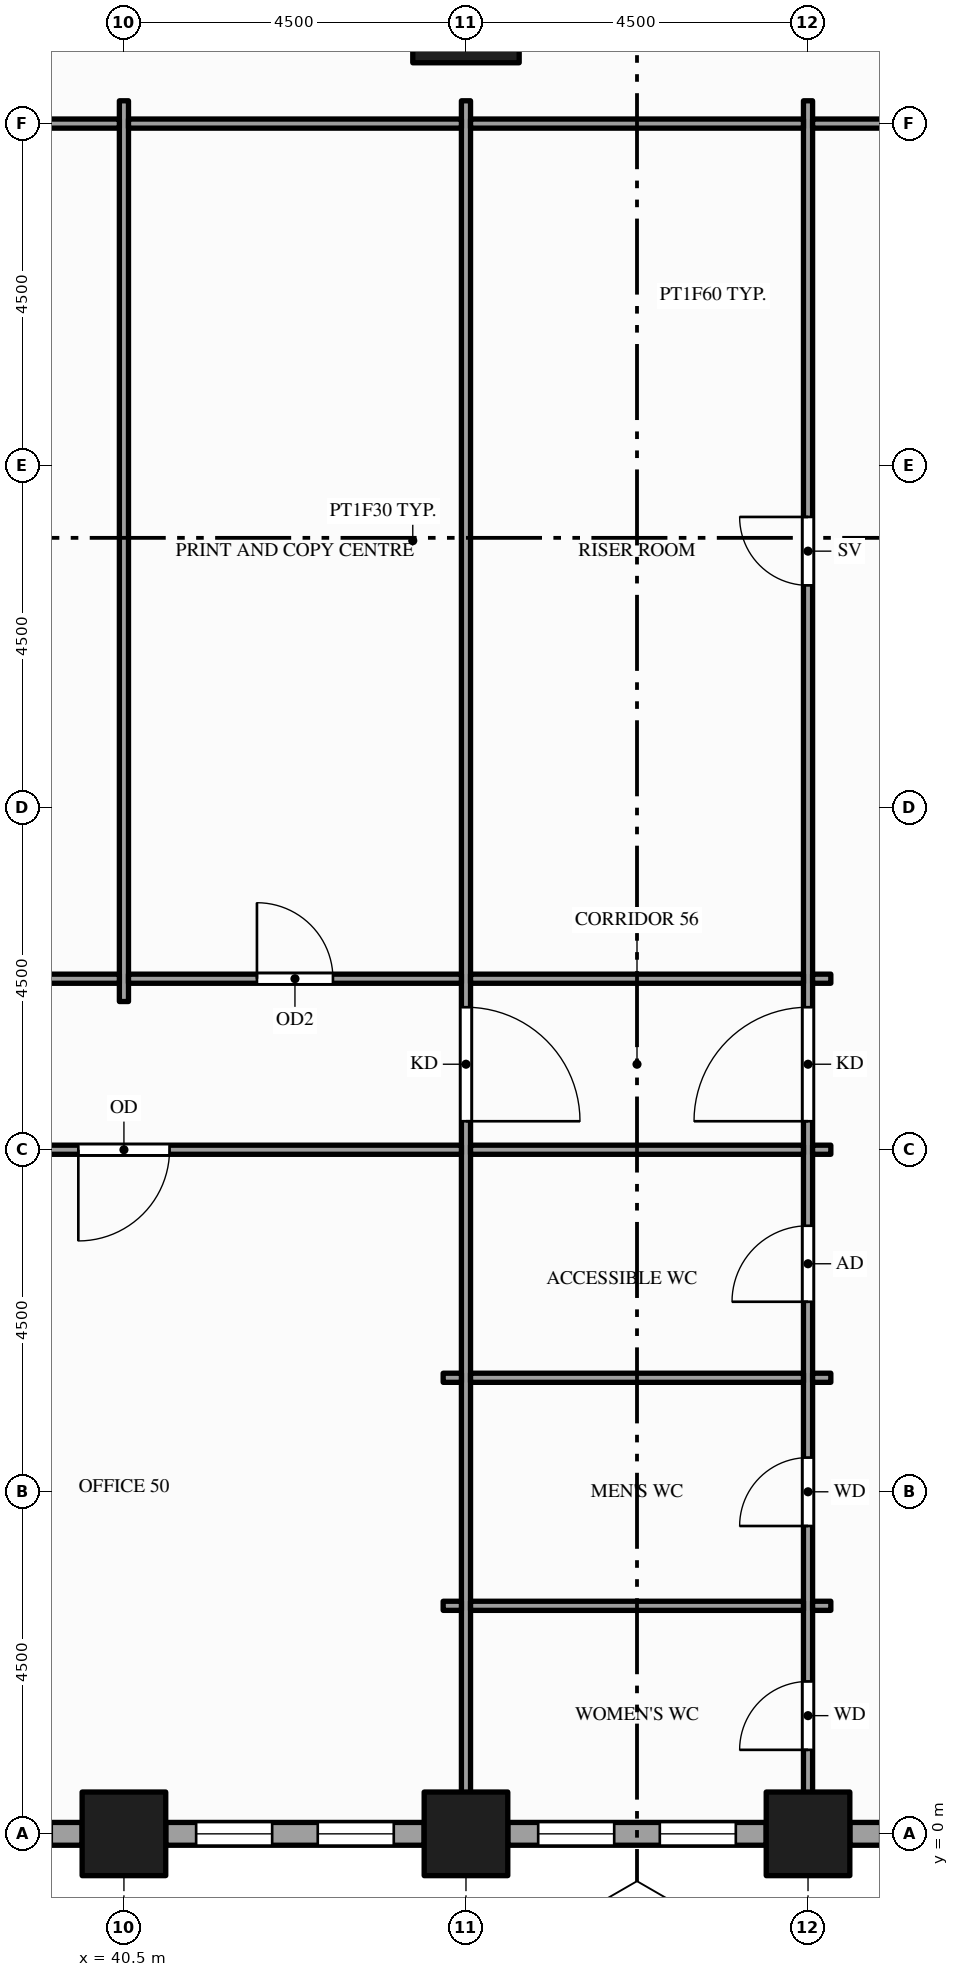
"""IFC4 building model, lengths in metres.
Left out: names, types, materials, properties, quantities, classifications, styles, units other than length and angle.
Written with IfcOpenShell. Run it as: python <this file> out.ifc"""

import sys

from ifc_helpers import new_model, si_unit, direction, frame, frame_2d, origin, origin_2d, place, context, subcontext, project, spatial, rectangle, hollow_rectangle, extrude, element, fill, save


model = new_model("IFC4")
c1 = context("Model", 3, precision=1e-05, world=origin(), true_north=direction((0.0, 1.0)))
c2 = subcontext(c1, "Body", "Model", "MODEL_VIEW")
j1 = project(units=[si_unit("LENGTHUNIT", "METRE"), si_unit("PLANEANGLEUNIT", "RADIAN")], contexts=[c1])
p1 = place(None, origin())
s1 = spatial("IfcSite", under=j1, at=p1, CompositionType="ELEMENT")
p2 = place(p1, origin())
s2 = spatial("IfcBuilding", under=s1, at=p2, CompositionType="ELEMENT")
p3 = place(p2, frame((0.0, 0.0, 19.0)))
s3 = spatial("IfcBuildingStorey", under=s2, at=p3, CompositionType="ELEMENT", Elevation=19.0)
for number, where, z_axis, x_axis in (
    (1, (40.5, 0.0, -0.25), (0.0, 0.0, 1.0), (1.0, 0.0, 0.0)),
    (2, (45.0, 0.0, -0.25), (0.0, 0.0, 1.0), (1.0, 0.0, 0.0)),
):
    element("IfcColumn", number, at=place(p3, frame(where, z_axis=z_axis, x_axis=x_axis)), inside=s3, PredefinedType="COLUMN", context=c2, shape_type="SweptSolid", body=[
        extrude(hollow_rectangle(XDim=1.1, YDim=1.1, WallThickness=0.06, at=origin_2d()), origin(), (0.0, 0.0, 1.0), 5.0),
    ])
p4 = place(p3, frame((45.0, 24.0, -0.25), z_axis=(0.0, 0.0, 1.0), x_axis=(1.0, 0.0, 0.0)))
e3 = element("IfcColumn", 3, at=p4, inside=s3, PredefinedType="COLUMN", context=c2, shape_type="SweptSolid", body=[
    extrude(hollow_rectangle(XDim=1.4, YDim=1.4, WallThickness=0.08, at=origin_2d()), origin(), (0.0, 0.0, 1.0), 5.0),
])
p5 = place(p3, frame((49.5, 0.0, -0.25), z_axis=(0.0, 0.0, 1.0), x_axis=(1.0, 0.0, 0.0)))
e4 = element("IfcColumn", 4, at=p5, inside=s3, PredefinedType="COLUMN", context=c2, shape_type="SweptSolid", body=[
    extrude(hollow_rectangle(XDim=1.1, YDim=1.1, WallThickness=0.06, at=origin_2d()), origin(), (0.0, 0.0, 1.0), 5.0),
])
p6 = place(p3, frame((36.55, 0.0, 0.0), z_axis=(0.0, 0.0, 1.0), x_axis=(1.0, 0.0, 0.0)))
e5 = element("IfcWall", 5, at=p6, inside=s3, PredefinedType="STANDARD", context=c2, shape_type="SweptSolid", body=[
    extrude(rectangle(XDim=3.4, YDim=0.3, at=frame_2d((1.7, 0.0))), origin(), (0.0, 0.0, 1.0), 4.036),
])
p7 = place(p6, frame((0.4, 0.0, 0.9)))
e6 = element("IfcOpeningElement", 6, at=p7, cuts=e5, PredefinedType="OPENING", context=c2, shape_type="SweptSolid", body=[
    extrude(rectangle(XDim=1.0, YDim=2.75, at=frame_2d((0.5, 1.375))), frame((0.0, 0.16, 0.0), z_axis=(0.0, -1.0, 0.0), x_axis=(1.0, 0.0, 0.0)), (0.0, 0.0, 1.0), 0.32),
])
p8 = place(p6, frame((2.0, 0.0, 0.9)))
e7 = element("IfcOpeningElement", 7, at=p8, cuts=e5, PredefinedType="OPENING", context=c2, shape_type="SweptSolid", body=[
    extrude(rectangle(XDim=1.0, YDim=2.75, at=frame_2d((0.5, 1.375))), frame((0.0, 0.16, 0.0), z_axis=(0.0, -1.0, 0.0), x_axis=(1.0, 0.0, 0.0)), (0.0, 0.0, 1.0), 0.32),
])
p9 = place(p3, frame((41.05, 0.0, 0.0), z_axis=(0.0, 0.0, 1.0), x_axis=(1.0, 0.0, 0.0)))
e8 = element("IfcWall", 8, at=p9, inside=s3, PredefinedType="STANDARD", context=c2, shape_type="SweptSolid", body=[
    extrude(rectangle(XDim=3.4, YDim=0.3, at=frame_2d((1.7, 0.0))), origin(), (0.0, 0.0, 1.0), 4.036),
])
p10 = place(p9, frame((0.4, 0.0, 0.9)))
e9 = element("IfcOpeningElement", 9, at=p10, cuts=e8, PredefinedType="OPENING", context=c2, shape_type="SweptSolid", body=[
    extrude(rectangle(XDim=1.0, YDim=2.75, at=frame_2d((0.5, 1.375))), frame((0.0, 0.16, 0.0), z_axis=(0.0, -1.0, 0.0), x_axis=(1.0, 0.0, 0.0)), (0.0, 0.0, 1.0), 0.32),
])
p11 = place(p9, frame((2.0, 0.0, 0.9)))
e10 = element("IfcOpeningElement", 10, at=p11, cuts=e8, PredefinedType="OPENING", context=c2, shape_type="SweptSolid", body=[
    extrude(rectangle(XDim=1.0, YDim=2.75, at=frame_2d((0.5, 1.375))), frame((0.0, 0.16, 0.0), z_axis=(0.0, -1.0, 0.0), x_axis=(1.0, 0.0, 0.0)), (0.0, 0.0, 1.0), 0.32),
])
p12 = place(p3, frame((45.55, 0.0, 0.0), z_axis=(0.0, 0.0, 1.0), x_axis=(1.0, 0.0, 0.0)))
e11 = element("IfcWall", 11, at=p12, inside=s3, PredefinedType="STANDARD", context=c2, shape_type="SweptSolid", body=[
    extrude(rectangle(XDim=3.4, YDim=0.3, at=frame_2d((1.7, 0.0))), origin(), (0.0, 0.0, 1.0), 4.036),
])
p13 = place(p12, frame((0.4, 0.0, 0.9)))
e12 = element("IfcOpeningElement", 12, at=p13, cuts=e11, PredefinedType="OPENING", context=c2, shape_type="SweptSolid", body=[
    extrude(rectangle(XDim=1.0, YDim=2.75, at=frame_2d((0.5, 1.375))), frame((0.0, 0.16, 0.0), z_axis=(0.0, -1.0, 0.0), x_axis=(1.0, 0.0, 0.0)), (0.0, 0.0, 1.0), 0.32),
])
p14 = place(p12, frame((2.0, 0.0, 0.9)))
e13 = element("IfcOpeningElement", 13, at=p14, cuts=e11, PredefinedType="OPENING", context=c2, shape_type="SweptSolid", body=[
    extrude(rectangle(XDim=1.0, YDim=2.75, at=frame_2d((0.5, 1.375))), frame((0.0, 0.16, 0.0), z_axis=(0.0, -1.0, 0.0), x_axis=(1.0, 0.0, 0.0)), (0.0, 0.0, 1.0), 0.32),
])
p15 = place(p3, frame((50.05, 0.0, 0.0), z_axis=(0.0, 0.0, 1.0), x_axis=(1.0, 0.0, 0.0)))
e14 = element("IfcWall", 14, at=p15, inside=s3, PredefinedType="STANDARD", context=c2, shape_type="SweptSolid", body=[
    extrude(rectangle(XDim=3.949, YDim=0.3, at=frame_2d((1.975, 0.0))), origin(), (0.0, 0.0, 1.0), 4.036),
])
p16 = place(p15, frame((0.4, 0.0, 0.9)))
e15 = element("IfcOpeningElement", 15, at=p16, cuts=e14, PredefinedType="OPENING", context=c2, shape_type="SweptSolid", body=[
    extrude(rectangle(XDim=1.0, YDim=2.75, at=frame_2d((0.5, 1.375))), frame((0.0, 0.16, 0.0), z_axis=(0.0, -1.0, 0.0), x_axis=(1.0, 0.0, 0.0)), (0.0, 0.0, 1.0), 0.32),
])
p17 = place(p15, frame((2.024, 0.0, 0.9)))
e16 = element("IfcOpeningElement", 16, at=p17, cuts=e14, PredefinedType="OPENING", context=c2, shape_type="SweptSolid", body=[
    extrude(rectangle(XDim=1.5, YDim=2.75, at=frame_2d((0.75, 1.375))), frame((0.0, 0.16, 0.0), z_axis=(0.0, -1.0, 0.0), x_axis=(1.0, 0.0, 0.0)), (0.0, 0.0, 1.0), 0.32),
])
p18 = place(p3, frame((40.5, 10.95, 0.0), z_axis=(0.0, 0.0, 1.0), x_axis=(0.0, 1.0, 0.0)))
e17 = element("IfcWall", 17, at=p18, inside=s3, PredefinedType="PARTITIONING", context=c2, shape_type="SweptSolid", body=[
    extrude(rectangle(XDim=11.85, YDim=0.12, at=frame_2d((5.925, 0.0))), origin(), (0.0, 0.0, 1.0), 3.759),
])
p19 = place(p3, frame((45.0, 0.15, 0.0), z_axis=(0.0, 0.0, 1.0), x_axis=(0.0, 1.0, 0.0)))
e18 = element("IfcWall", 18, at=p19, inside=s3, PredefinedType="PARTITIONING", context=c2, shape_type="SweptSolid", body=[
    extrude(rectangle(XDim=22.65, YDim=0.12, at=frame_2d((11.325, 0.0))), origin(), (0.0, 0.0, 1.0), 3.759),
])
p20 = place(p19, frame((9.225, 0.0, 0.0)))
e19 = element("IfcOpeningElement", 19, at=p20, cuts=e18, PredefinedType="OPENING", context=c2, shape_type="SweptSolid", body=[
    extrude(rectangle(XDim=1.5, YDim=2.1, at=frame_2d((0.75, 1.05))), frame((0.0, 0.07, 0.0), z_axis=(0.0, -1.0, 0.0), x_axis=(1.0, 0.0, 0.0)), (0.0, 0.0, 1.0), 0.14),
])
p21 = place(p3, frame((49.5, 0.15, 0.0), z_axis=(0.0, 0.0, 1.0), x_axis=(0.0, 1.0, 0.0)))
e20 = element("IfcWall", 20, at=p21, inside=s3, PredefinedType="PARTITIONING", context=c2, shape_type="SweptSolid", body=[
    extrude(rectangle(XDim=22.65, YDim=0.12, at=frame_2d((11.325, 0.0))), origin(), (0.0, 0.0, 1.0), 3.759),
])
p22 = place(p21, frame((0.955, 0.0, 0.0)))
e21 = element("IfcOpeningElement", 21, at=p22, cuts=e20, PredefinedType="OPENING", context=c2, shape_type="SweptSolid", body=[
    extrude(rectangle(XDim=0.9, YDim=2.1, at=frame_2d((0.45, 1.05))), frame((0.0, 0.07, 0.0), z_axis=(0.0, -1.0, 0.0), x_axis=(1.0, 0.0, 0.0)), (0.0, 0.0, 1.0), 0.14),
])
p23 = place(p21, frame((3.9, 0.0, 0.0)))
e22 = element("IfcOpeningElement", 22, at=p23, cuts=e20, PredefinedType="OPENING", context=c2, shape_type="SweptSolid", body=[
    extrude(rectangle(XDim=0.9, YDim=2.1, at=frame_2d((0.45, 1.05))), frame((0.0, 0.07, 0.0), z_axis=(0.0, -1.0, 0.0), x_axis=(1.0, 0.0, 0.0)), (0.0, 0.0, 1.0), 0.14),
])
p24 = place(p21, frame((6.85, 0.0, 0.0)))
e23 = element("IfcOpeningElement", 23, at=p24, cuts=e20, PredefinedType="OPENING", context=c2, shape_type="SweptSolid", body=[
    extrude(rectangle(XDim=1.0, YDim=2.1, at=frame_2d((0.5, 1.05))), frame((0.0, 0.07, 0.0), z_axis=(0.0, -1.0, 0.0), x_axis=(1.0, 0.0, 0.0)), (0.0, 0.0, 1.0), 0.14),
])
p25 = place(p21, frame((16.275, 0.0, 0.0)))
e24 = element("IfcOpeningElement", 24, at=p25, cuts=e20, PredefinedType="OPENING", context=c2, shape_type="SweptSolid", body=[
    extrude(rectangle(XDim=0.9, YDim=2.1, at=frame_2d((0.45, 1.05))), frame((0.0, 0.07, 0.0), z_axis=(0.0, -1.0, 0.0), x_axis=(1.0, 0.0, 0.0)), (0.0, 0.0, 1.0), 0.14),
])
p26 = place(p21, frame((9.225, 0.0, 0.0)))
e25 = element("IfcOpeningElement", 25, at=p26, cuts=e20, PredefinedType="OPENING", context=c2, shape_type="SweptSolid", body=[
    extrude(rectangle(XDim=1.5, YDim=2.1, at=frame_2d((0.75, 1.05))), frame((0.0, 0.07, 0.0), z_axis=(0.0, -1.0, 0.0), x_axis=(1.0, 0.0, 0.0)), (0.0, 0.0, 1.0), 0.14),
])
p27 = place(p3, frame((44.7, 3.0, 0.0), z_axis=(0.0, 0.0, 1.0), x_axis=(1.0, 0.0, 0.0)))
e26 = element("IfcWall", 26, at=p27, inside=s3, PredefinedType="PARTITIONING", context=c2, shape_type="SweptSolid", body=[
    extrude(rectangle(XDim=0.24, YDim=0.12, at=frame_2d((0.12, 0.0))), origin(), (0.0, 0.0, 1.0), 3.759),
])
p28 = place(p3, frame((45.06, 3.0, 0.0), z_axis=(0.0, 0.0, 1.0), x_axis=(1.0, 0.0, 0.0)))
e27 = element("IfcWall", 27, at=p28, inside=s3, PredefinedType="PARTITIONING", context=c2, shape_type="SweptSolid", body=[
    extrude(rectangle(XDim=4.38, YDim=0.12, at=frame_2d((2.19, 0.0))), origin(), (0.0, 0.0, 1.0), 3.66),
])
for number, where, z_axis, x_axis in (
    (28, (49.56, 3.0, 0.0), (0.0, 0.0, 1.0), (1.0, 0.0, 0.0)),
    (29, (44.7, 6.0, 0.0), (0.0, 0.0, 1.0), (1.0, 0.0, 0.0)),
):
    element("IfcWall", number, at=place(p3, frame(where, z_axis=z_axis, x_axis=x_axis)), inside=s3, PredefinedType="PARTITIONING", context=c2, shape_type="SweptSolid", body=[
        extrude(rectangle(XDim=0.24, YDim=0.12, at=frame_2d((0.12, 0.0))), origin(), (0.0, 0.0, 1.0), 3.759),
    ])
p29 = place(p3, frame((45.06, 6.0, 0.0), z_axis=(0.0, 0.0, 1.0), x_axis=(1.0, 0.0, 0.0)))
e30 = element("IfcWall", 30, at=p29, inside=s3, PredefinedType="PARTITIONING", context=c2, shape_type="SweptSolid", body=[
    extrude(rectangle(XDim=4.38, YDim=0.12, at=frame_2d((2.19, 0.0))), origin(), (0.0, 0.0, 1.0), 3.66),
])
p30 = place(p3, frame((49.56, 6.0, 0.0), z_axis=(0.0, 0.0, 1.0), x_axis=(1.0, 0.0, 0.0)))
e31 = element("IfcWall", 31, at=p30, inside=s3, PredefinedType="PARTITIONING", context=c2, shape_type="SweptSolid", body=[
    extrude(rectangle(XDim=0.24, YDim=0.12, at=frame_2d((0.12, 0.0))), origin(), (0.0, 0.0, 1.0), 3.759),
])
p31 = place(p3, frame((36.06, 9.0, 0.0), z_axis=(0.0, 0.0, 1.0), x_axis=(1.0, 0.0, 0.0)))
e32 = element("IfcWall", 32, at=p31, inside=s3, PredefinedType="PARTITIONING", context=c2, shape_type="SweptSolid", body=[
    extrude(rectangle(XDim=8.88, YDim=0.12, at=frame_2d((4.44, 0.0))), origin(), (0.0, 0.0, 1.0), 3.66),
])
p32 = place(p31, frame((3.84, 0.0, 0.0)))
e33 = element("IfcOpeningElement", 33, at=p32, cuts=e32, PredefinedType="OPENING", context=c2, shape_type="SweptSolid", body=[
    extrude(rectangle(XDim=1.2, YDim=2.1, at=frame_2d((0.6, 1.05))), frame((0.0, 0.07, 0.0), z_axis=(0.0, -1.0, 0.0), x_axis=(1.0, 0.0, 0.0)), (0.0, 0.0, 1.0), 0.14),
])
p33 = place(p3, frame((45.06, 9.0, 0.0), z_axis=(0.0, 0.0, 1.0), x_axis=(1.0, 0.0, 0.0)))
e34 = element("IfcWall", 34, at=p33, inside=s3, PredefinedType="PARTITIONING", context=c2, shape_type="SweptSolid", body=[
    extrude(rectangle(XDim=4.38, YDim=0.12, at=frame_2d((2.19, 0.0))), origin(), (0.0, 0.0, 1.0), 3.66),
])
p34 = place(p3, frame((49.56, 9.0, 0.0), z_axis=(0.0, 0.0, 1.0), x_axis=(1.0, 0.0, 0.0)))
e35 = element("IfcWall", 35, at=p34, inside=s3, PredefinedType="PARTITIONING", context=c2, shape_type="SweptSolid", body=[
    extrude(rectangle(XDim=0.24, YDim=0.12, at=frame_2d((0.12, 0.0))), origin(), (0.0, 0.0, 1.0), 3.759),
])
p35 = place(p3, frame((36.06, 11.25, 0.0), z_axis=(0.0, 0.0, 1.0), x_axis=(1.0, 0.0, 0.0)))
e36 = element("IfcWall", 36, at=p35, inside=s3, PredefinedType="PARTITIONING", context=c2, shape_type="SweptSolid", body=[
    extrude(rectangle(XDim=4.38, YDim=0.12, at=frame_2d((2.19, 0.0))), origin(), (0.0, 0.0, 1.0), 3.66),
])
p36 = place(p35, frame((1.69, 0.0, 0.0)))
e37 = element("IfcOpeningElement", 37, at=p36, cuts=e36, PredefinedType="OPENING", context=c2, shape_type="SweptSolid", body=[
    extrude(rectangle(XDim=1.0, YDim=2.1, at=frame_2d((0.5, 1.05))), frame((0.0, 0.07, 0.0), z_axis=(0.0, -1.0, 0.0), x_axis=(1.0, 0.0, 0.0)), (0.0, 0.0, 1.0), 0.14),
])
p37 = place(p3, frame((40.56, 11.25, 0.0), z_axis=(0.0, 0.0, 1.0), x_axis=(1.0, 0.0, 0.0)))
e38 = element("IfcWall", 38, at=p37, inside=s3, PredefinedType="PARTITIONING", context=c2, shape_type="SweptSolid", body=[
    extrude(rectangle(XDim=4.38, YDim=0.12, at=frame_2d((2.19, 0.0))), origin(), (0.0, 0.0, 1.0), 3.66),
])
p38 = place(p37, frame((1.69, 0.0, 0.0)))
e39 = element("IfcOpeningElement", 39, at=p38, cuts=e38, PredefinedType="OPENING", context=c2, shape_type="SweptSolid", body=[
    extrude(rectangle(XDim=1.0, YDim=2.1, at=frame_2d((0.5, 1.05))), frame((0.0, 0.07, 0.0), z_axis=(0.0, -1.0, 0.0), x_axis=(1.0, 0.0, 0.0)), (0.0, 0.0, 1.0), 0.14),
])
p39 = place(p3, frame((45.06, 11.25, 0.0), z_axis=(0.0, 0.0, 1.0), x_axis=(1.0, 0.0, 0.0)))
e40 = element("IfcWall", 40, at=p39, inside=s3, PredefinedType="PARTITIONING", context=c2, shape_type="SweptSolid", body=[
    extrude(rectangle(XDim=4.38, YDim=0.12, at=frame_2d((2.19, 0.0))), origin(), (0.0, 0.0, 1.0), 3.66),
])
p40 = place(p3, frame((49.56, 11.25, 0.0), z_axis=(0.0, 0.0, 1.0), x_axis=(1.0, 0.0, 0.0)))
e41 = element("IfcWall", 41, at=p40, inside=s3, PredefinedType="PARTITIONING", context=c2, shape_type="SweptSolid", body=[
    extrude(rectangle(XDim=0.24, YDim=0.12, at=frame_2d((0.12, 0.0))), origin(), (0.0, 0.0, 1.0), 3.759),
])
for number, where, z_axis, x_axis in (
    (42, (36.06, 22.5, 0.0), (0.0, 0.0, 1.0), (1.0, 0.0, 0.0)),
    (43, (40.56, 22.5, 0.0), (0.0, 0.0, 1.0), (1.0, 0.0, 0.0)),
    (44, (45.06, 22.5, 0.0), (0.0, 0.0, 1.0), (1.0, 0.0, 0.0)),
):
    element("IfcWall", number, at=place(p3, frame(where, z_axis=z_axis, x_axis=x_axis)), inside=s3, PredefinedType="PARTITIONING", context=c2, shape_type="SweptSolid", body=[
        extrude(rectangle(XDim=4.38, YDim=0.12, at=frame_2d((2.19, 0.0))), origin(), (0.0, 0.0, 1.0), 3.66),
    ])
p41 = place(p3, frame((49.56, 22.5, 0.0), z_axis=(0.0, 0.0, 1.0), x_axis=(1.0, 0.0, 0.0)))
e45 = element("IfcWall", 45, at=p41, inside=s3, PredefinedType="PARTITIONING", context=c2, shape_type="SweptSolid", body=[
    extrude(rectangle(XDim=4.54, YDim=0.12, at=frame_2d((2.27, 0.0))), origin(), (0.0, 0.0, 1.0), 3.66),
])
p42 = place(p41, frame((1.29, 0.0, 0.0)))
e46 = element("IfcOpeningElement", 46, at=p42, cuts=e45, PredefinedType="OPENING", context=c2, shape_type="SweptSolid", body=[
    extrude(rectangle(XDim=1.8, YDim=2.1, at=frame_2d((0.9, 1.05))), frame((0.0, 0.07, 0.0), z_axis=(0.0, -1.0, 0.0), x_axis=(1.0, 0.0, 0.0)), (0.0, 0.0, 1.0), 0.14),
])
p43 = place(p10, origin())
e47 = element("IfcWindow", 47, at=p43, inside=s3, PartitioningType="SINGLE_PANEL", PredefinedType="WINDOW", context=c2, shape_type="SweptSolid", body=[
    extrude(rectangle(XDim=1.0, YDim=2.75, at=frame_2d((0.5, 1.375))), frame((0.0, 0.03, 0.0), z_axis=(0.0, -1.0, 0.0), x_axis=(1.0, 0.0, 0.0)), (0.0, 0.0, 1.0), 0.06),
])
fill(e9, e47)
p44 = place(p11, origin())
e48 = element("IfcWindow", 48, at=p44, inside=s3, PartitioningType="SINGLE_PANEL", PredefinedType="WINDOW", context=c2, shape_type="SweptSolid", body=[
    extrude(rectangle(XDim=1.0, YDim=2.75, at=frame_2d((0.5, 1.375))), frame((0.0, 0.03, 0.0), z_axis=(0.0, -1.0, 0.0), x_axis=(1.0, 0.0, 0.0)), (0.0, 0.0, 1.0), 0.06),
])
fill(e10, e48)
p45 = place(p13, origin())
e49 = element("IfcWindow", 49, at=p45, inside=s3, PartitioningType="SINGLE_PANEL", PredefinedType="WINDOW", context=c2, shape_type="SweptSolid", body=[
    extrude(rectangle(XDim=1.0, YDim=2.75, at=frame_2d((0.5, 1.375))), frame((0.0, 0.03, 0.0), z_axis=(0.0, -1.0, 0.0), x_axis=(1.0, 0.0, 0.0)), (0.0, 0.0, 1.0), 0.06),
])
fill(e12, e49)
p46 = place(p14, origin())
e50 = element("IfcWindow", 50, at=p46, inside=s3, PartitioningType="SINGLE_PANEL", PredefinedType="WINDOW", context=c2, shape_type="SweptSolid", body=[
    extrude(rectangle(XDim=1.0, YDim=2.75, at=frame_2d((0.5, 1.375))), frame((0.0, 0.03, 0.0), z_axis=(0.0, -1.0, 0.0), x_axis=(1.0, 0.0, 0.0)), (0.0, 0.0, 1.0), 0.06),
])
fill(e13, e50)
p47 = place(p22, origin())
e51 = element("IfcDoor", 51, at=p47, inside=s3, OperationType="SINGLE_SWING_LEFT", PredefinedType="DOOR", context=c2, shape_type="SweptSolid", body=[
    extrude(rectangle(XDim=0.9, YDim=2.1, at=frame_2d((0.45, 1.05))), frame((0.0, 0.025, 0.0), z_axis=(0.0, -1.0, 0.0), x_axis=(1.0, 0.0, 0.0)), (0.0, 0.0, 1.0), 0.05),
])
fill(e21, e51)
p48 = place(p23, origin())
e52 = element("IfcDoor", 52, at=p48, inside=s3, OperationType="SINGLE_SWING_LEFT", PredefinedType="DOOR", context=c2, shape_type="SweptSolid", body=[
    extrude(rectangle(XDim=0.9, YDim=2.1, at=frame_2d((0.45, 1.05))), frame((0.0, 0.025, 0.0), z_axis=(0.0, -1.0, 0.0), x_axis=(1.0, 0.0, 0.0)), (0.0, 0.0, 1.0), 0.05),
])
fill(e22, e52)
p49 = place(p24, origin())
e53 = element("IfcDoor", 53, at=p49, inside=s3, OperationType="SINGLE_SWING_LEFT", PredefinedType="DOOR", context=c2, shape_type="SweptSolid", body=[
    extrude(rectangle(XDim=1.0, YDim=2.1, at=frame_2d((0.5, 1.05))), frame((0.0, 0.025, 0.0), z_axis=(0.0, -1.0, 0.0), x_axis=(1.0, 0.0, 0.0)), (0.0, 0.0, 1.0), 0.05),
])
fill(e23, e53)
p50 = place(p25, origin())
e54 = element("IfcDoor", 54, at=p50, inside=s3, OperationType="SINGLE_SWING_RIGHT", PredefinedType="DOOR", context=c2, shape_type="SweptSolid", body=[
    extrude(rectangle(XDim=0.9, YDim=2.1, at=frame_2d((0.45, 1.05))), frame((0.0, 0.025, 0.0), z_axis=(0.0, -1.0, 0.0), x_axis=(1.0, 0.0, 0.0)), (0.0, 0.0, 1.0), 0.05),
])
fill(e24, e54)
p51 = place(p26, origin())
e55 = element("IfcDoor", 55, at=p51, inside=s3, OperationType="SINGLE_SWING_LEFT", PredefinedType="DOOR", context=c2, shape_type="SweptSolid", body=[
    extrude(rectangle(XDim=1.5, YDim=2.1, at=frame_2d((0.75, 1.05))), frame((0.0, 0.025, 0.0), z_axis=(0.0, -1.0, 0.0), x_axis=(1.0, 0.0, 0.0)), (0.0, 0.0, 1.0), 0.05),
])
fill(e25, e55)
p52 = place(p20, origin())
e56 = element("IfcDoor", 56, at=p52, inside=s3, OperationType="SINGLE_SWING_LEFT", PredefinedType="DOOR", context=c2, shape_type="SweptSolid", body=[
    extrude(rectangle(XDim=1.5, YDim=2.1, at=frame_2d((0.75, 1.05))), frame((0.0, 0.025, 0.0), z_axis=(0.0, -1.0, 0.0), x_axis=(1.0, 0.0, 0.0)), (0.0, 0.0, 1.0), 0.05),
])
fill(e19, e56)
p53 = place(p32, origin())
e57 = element("IfcDoor", 57, at=p53, inside=s3, OperationType="SINGLE_SWING_LEFT", PredefinedType="DOOR", context=c2, shape_type="SweptSolid", body=[
    extrude(rectangle(XDim=1.2, YDim=2.1, at=frame_2d((0.6, 1.05))), frame((0.0, 0.025, 0.0), z_axis=(0.0, -1.0, 0.0), x_axis=(1.0, 0.0, 0.0)), (0.0, 0.0, 1.0), 0.05),
])
fill(e33, e57)
p54 = place(p38, origin())
e58 = element("IfcDoor", 58, at=p54, inside=s3, OperationType="SINGLE_SWING_LEFT", PredefinedType="DOOR", context=c2, shape_type="SweptSolid", body=[
    extrude(rectangle(XDim=1.0, YDim=2.1, at=frame_2d((0.5, 1.05))), frame((0.0, 0.025, 0.0), z_axis=(0.0, -1.0, 0.0), x_axis=(1.0, 0.0, 0.0)), (0.0, 0.0, 1.0), 0.05),
])
fill(e39, e58)
save(model, sys.argv[1])
